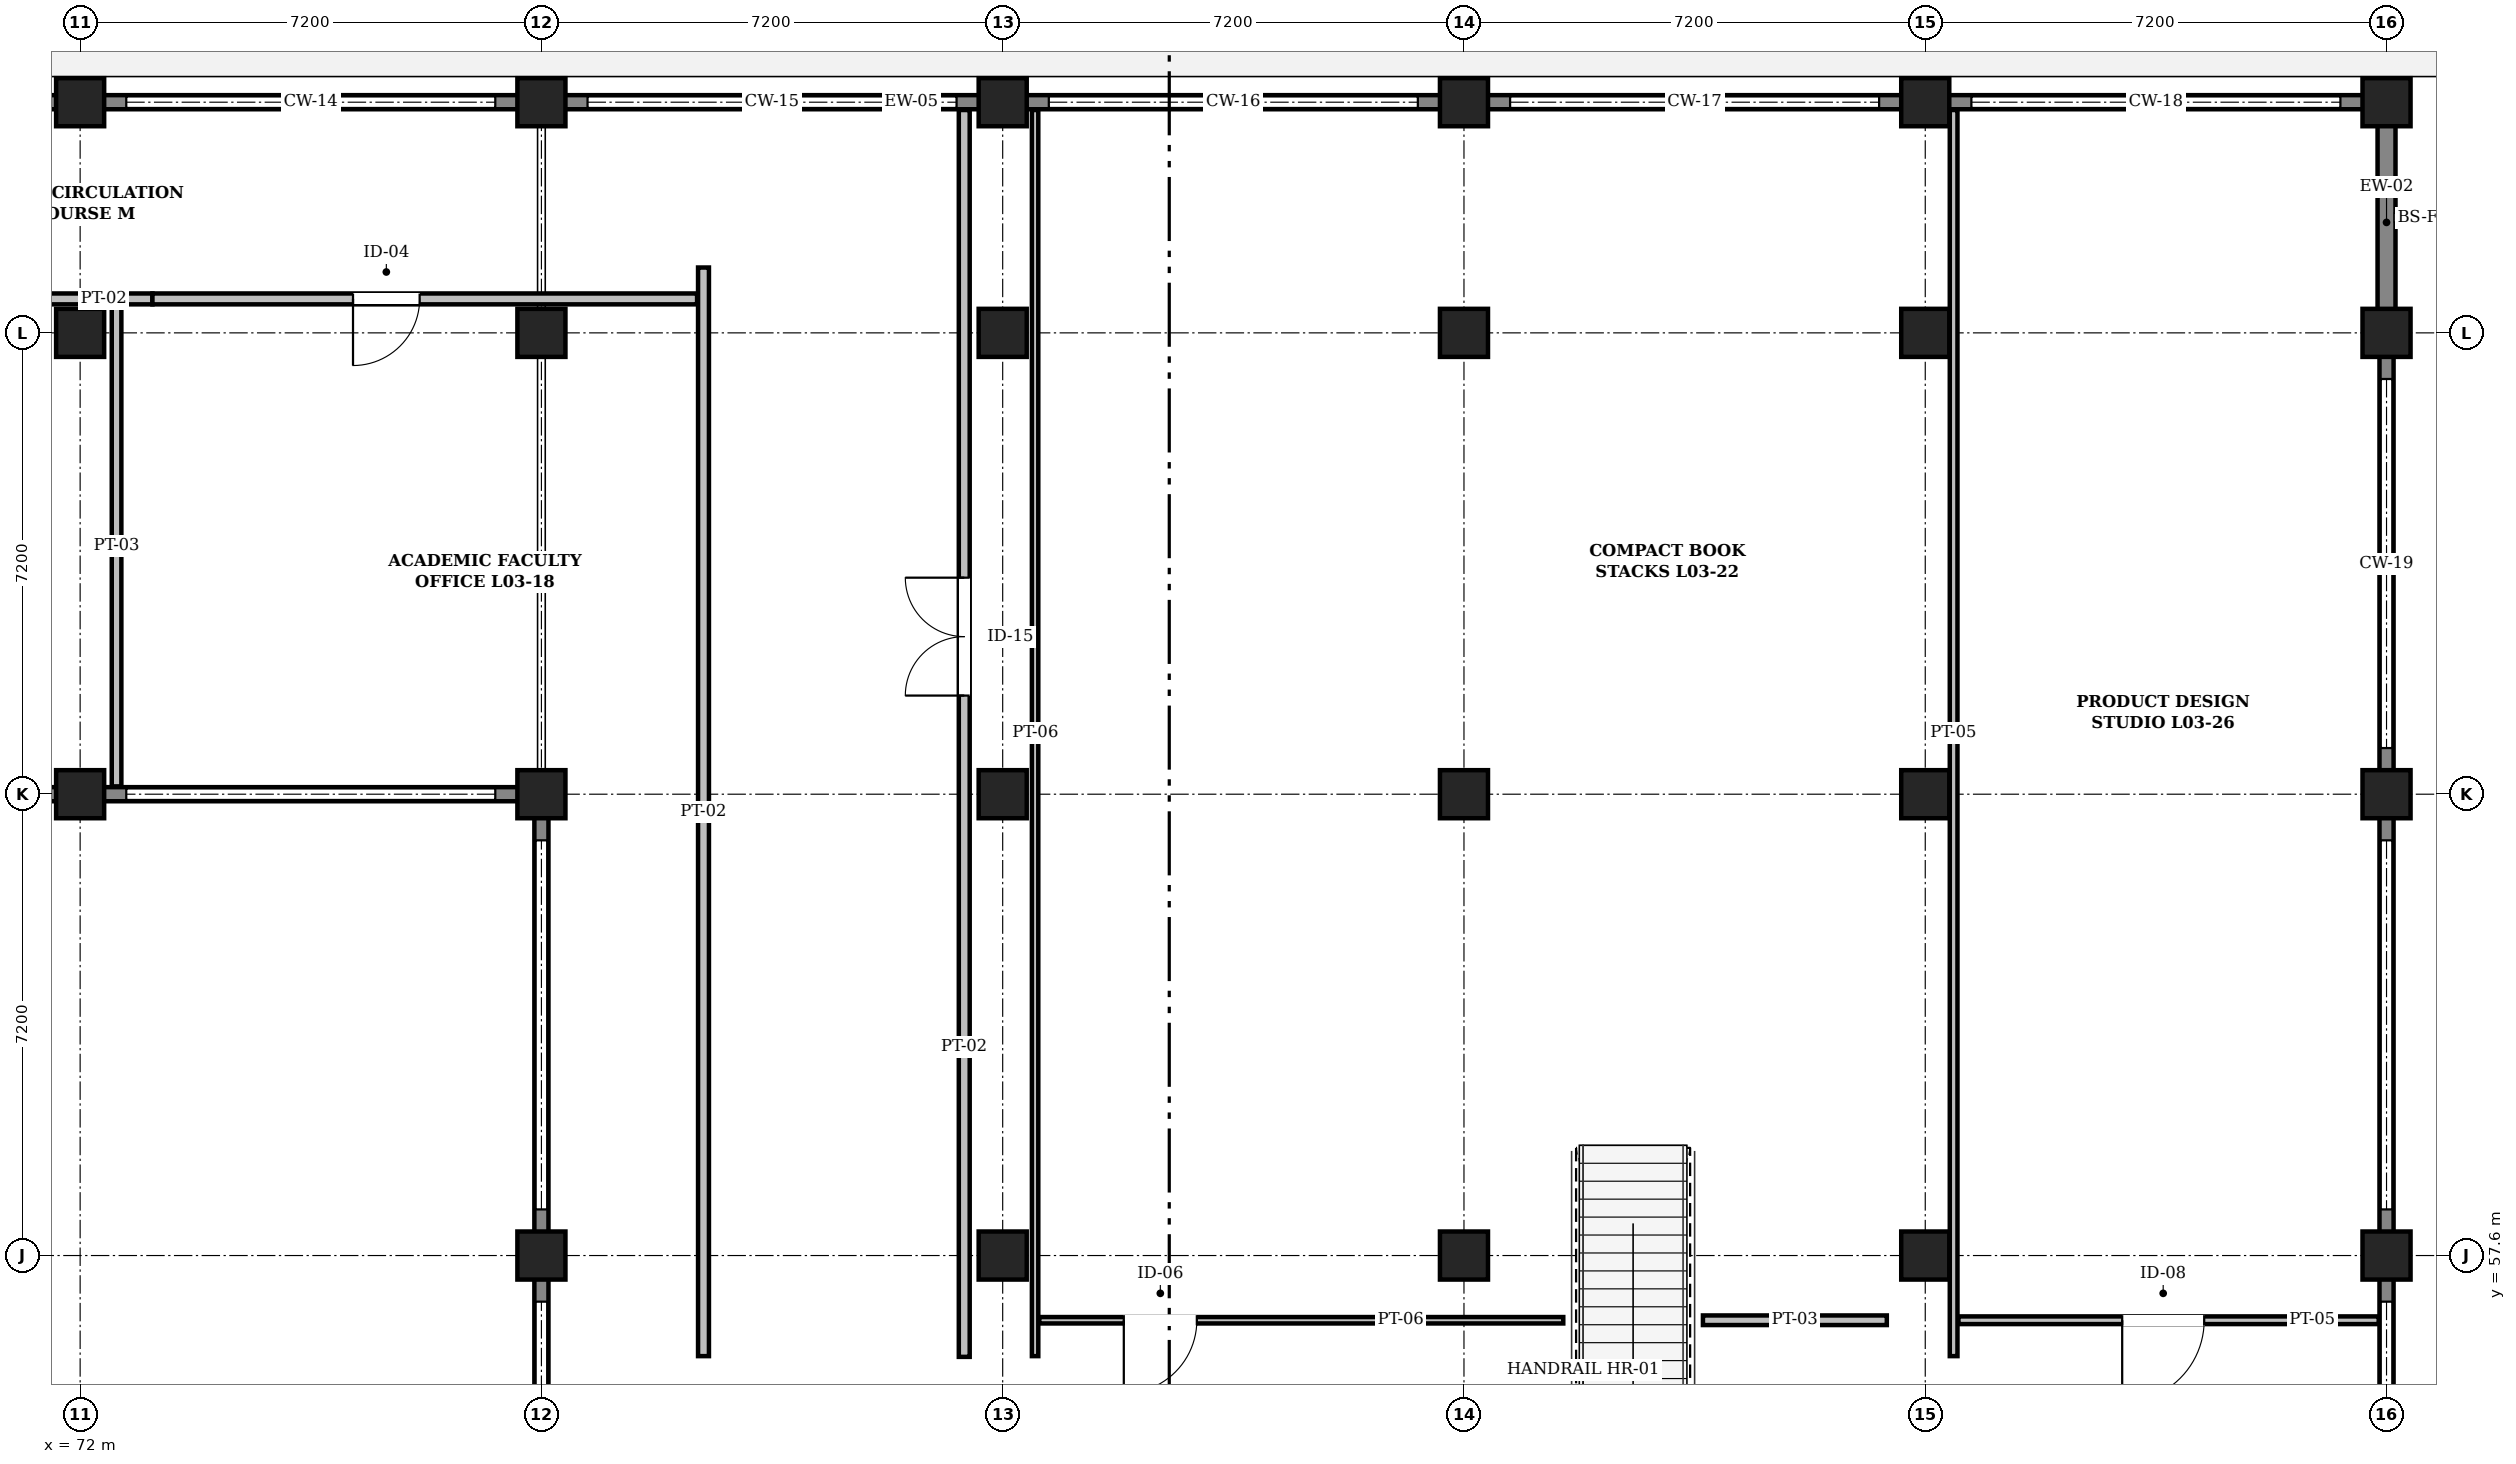
"""IFC4 building model, lengths in metres.
Left out: names, types, materials, properties, quantities, classifications, styles, units other than length and angle.
Written with IfcOpenShell. Run it as: python <this file> out.ifc"""

import sys

from ifc_helpers import new_model, si_unit, direction, frame, frame_2d, origin, origin_2d, place, context, subcontext, project, spatial, rectangle, extrude, element, fill, save


model = new_model("IFC4")
c1 = context("Model", 3, precision=1e-05, world=origin(), true_north=direction((0.0, 1.0)))
c2 = subcontext(c1, "Body", "Model", "MODEL_VIEW")
j1 = project(units=[si_unit("LENGTHUNIT", "METRE"), si_unit("PLANEANGLEUNIT", "RADIAN")], contexts=[c1])
p1 = place(None, origin())
s1 = spatial("IfcSite", under=j1, at=p1, CompositionType="ELEMENT")
p2 = place(p1, origin())
s2 = spatial("IfcBuilding", under=s1, at=p2, CompositionType="ELEMENT")
p3 = place(p2, frame((0.0, 0.0, 14.4)))
s3 = spatial("IfcBuildingStorey", under=s2, at=p3, CompositionType="ELEMENT", Elevation=14.4)
for number, where, z_axis, x_axis in (
    (1, (72.0, 64.8, 0.0), (0.0, 0.0, 1.0), (1.0, 0.0, 0.0)),
    (2, (72.0, 72.0, 0.0), (0.0, 0.0, 1.0), (1.0, 0.0, 0.0)),
    (3, (72.0, 75.6, 0.0), (0.0, 0.0, 1.0), (1.0, 0.0, 0.0)),
    (4, (79.2, 57.6, 0.0), (0.0, 0.0, 1.0), (1.0, 0.0, 0.0)),
    (5, (79.2, 64.8, 0.0), (0.0, 0.0, 1.0), (1.0, 0.0, 0.0)),
    (6, (79.2, 72.0, 0.0), (0.0, 0.0, 1.0), (1.0, 0.0, 0.0)),
    (7, (79.2, 75.6, 0.0), (0.0, 0.0, 1.0), (1.0, 0.0, 0.0)),
    (8, (86.4, 57.6, 0.0), (0.0, 0.0, 1.0), (1.0, 0.0, 0.0)),
    (9, (86.4, 64.8, 0.0), (0.0, 0.0, 1.0), (1.0, 0.0, 0.0)),
    (10, (86.4, 72.0, 0.0), (0.0, 0.0, 1.0), (1.0, 0.0, 0.0)),
    (11, (86.4, 75.6, 0.0), (0.0, 0.0, 1.0), (1.0, 0.0, 0.0)),
    (12, (93.6, 57.6, 0.0), (0.0, 0.0, 1.0), (1.0, 0.0, 0.0)),
    (13, (93.6, 64.8, 0.0), (0.0, 0.0, 1.0), (1.0, 0.0, 0.0)),
    (14, (93.6, 72.0, 0.0), (0.0, 0.0, 1.0), (1.0, 0.0, 0.0)),
    (15, (93.6, 75.6, 0.0), (0.0, 0.0, 1.0), (1.0, 0.0, 0.0)),
    (16, (100.8, 57.6, 0.0), (0.0, 0.0, 1.0), (1.0, 0.0, 0.0)),
    (17, (100.8, 64.8, 0.0), (0.0, 0.0, 1.0), (1.0, 0.0, 0.0)),
    (18, (100.8, 72.0, 0.0), (0.0, 0.0, 1.0), (1.0, 0.0, 0.0)),
    (19, (100.8, 75.6, 0.0), (0.0, 0.0, 1.0), (1.0, 0.0, 0.0)),
    (20, (108.0, 57.6, 0.0), (0.0, 0.0, 1.0), (1.0, 0.0, 0.0)),
    (21, (108.0, 64.8, 0.0), (0.0, 0.0, 1.0), (1.0, 0.0, 0.0)),
    (22, (108.0, 72.0, 0.0), (0.0, 0.0, 1.0), (1.0, 0.0, 0.0)),
    (23, (108.0, 75.6, 0.0), (0.0, 0.0, 1.0), (1.0, 0.0, 0.0)),
):
    element("IfcColumn", number, at=place(p3, frame(where, z_axis=z_axis, x_axis=x_axis)), inside=s3, PredefinedType="COLUMN", context=c2, shape_type="SweptSolid", body=[
        extrude(rectangle(XDim=0.75, YDim=0.75, at=origin_2d()), origin(), (0.0, 0.0, 1.0), 4.5),
    ])
for number, where, z_axis, x_axis in (
    (24, (64.8, 75.6, 0.0), (0.0, 0.0, 1.0), (1.0, 0.0, 0.0)),
    (25, (72.0, 75.6, 0.0), (0.0, 0.0, 1.0), (1.0, 0.0, 0.0)),
    (26, (79.2, 75.6, 0.0), (0.0, 0.0, 1.0), (1.0, 0.0, 0.0)),
):
    element("IfcWall", number, at=place(p3, frame(where, z_axis=z_axis, x_axis=x_axis)), inside=s3, PredefinedType="SOLIDWALL", context=c2, shape_type="SweptSolid", body=[
        extrude(rectangle(XDim=7.2, YDim=0.22, at=frame_2d((3.6, 0.0))), origin(), (0.0, 0.0, 1.0), 1.24),
    ])
p4 = place(p3, frame((86.4, 75.6, 0.0), z_axis=(0.0, 0.0, 1.0), x_axis=(1.0, 0.0, 0.0)))
e27 = element("IfcWall", 27, at=p4, inside=s3, PredefinedType="SOLIDWALL", context=c2, shape_type="SweptSolid", body=[
    extrude(rectangle(XDim=7.2, YDim=0.22, at=frame_2d((3.6, 0.0))), origin(), (0.0, 0.0, 1.0), 1.24),
])
p5 = place(p3, frame((93.6, 75.6, 0.0), z_axis=(0.0, 0.0, 1.0), x_axis=(1.0, 0.0, 0.0)))
e28 = element("IfcWall", 28, at=p5, inside=s3, PredefinedType="SOLIDWALL", context=c2, shape_type="SweptSolid", body=[
    extrude(rectangle(XDim=7.2, YDim=0.22, at=frame_2d((3.6, 0.0))), origin(), (0.0, 0.0, 1.0), 1.24),
])
p6 = place(p3, frame((100.8, 75.6, 0.0), z_axis=(0.0, 0.0, 1.0), x_axis=(1.0, 0.0, 0.0)))
e29 = element("IfcWall", 29, at=p6, inside=s3, PredefinedType="SOLIDWALL", context=c2, shape_type="SweptSolid", body=[
    extrude(rectangle(XDim=7.35, YDim=0.22, at=frame_2d((3.675, 0.0))), origin(), (0.0, 0.0, 1.0), 1.24),
])
p7 = place(p3, frame((108.0, 75.448, 0.0), z_axis=(0.0, 0.0, 1.0), x_axis=(0.0, -1.0, 0.0)))
e30 = element("IfcWall", 30, at=p7, inside=s3, PredefinedType="SOLIDWALL", context=c2, shape_type="SweptSolid", body=[
    extrude(rectangle(XDim=3.448, YDim=0.28, at=frame_2d((1.724, 0.0))), origin(), (0.0, 0.0, 1.0), 4.22),
])
for number, where, z_axis, x_axis in (
    (31, (108.0, 72.0, 0.0), (0.0, 0.0, 1.0), (0.0, -1.0, 0.0)),
    (32, (108.0, 64.8, 0.0), (0.0, 0.0, 1.0), (0.0, -1.0, 0.0)),
):
    element("IfcWall", number, at=place(p3, frame(where, z_axis=z_axis, x_axis=x_axis)), inside=s3, PredefinedType="SOLIDWALL", context=c2, shape_type="SweptSolid", body=[
        extrude(rectangle(XDim=7.2, YDim=0.22, at=frame_2d((3.6, 0.0))), origin(), (0.0, 0.0, 1.0), 1.24),
    ])
for number, where, z_axis, x_axis in (
    (33, (108.0, 57.6, 0.0), (0.0, 0.0, 1.0), (0.0, -1.0, 0.0)),
    (34, (79.2, 50.4, 0.0), (0.0, 0.0, 1.0), (0.0, 1.0, 0.0)),
):
    element("IfcWall", number, at=place(p3, frame(where, z_axis=z_axis, x_axis=x_axis)), inside=s3, PredefinedType="SOLIDWALL", context=c2, shape_type="SweptSolid", body=[
        extrude(rectangle(XDim=7.2, YDim=0.22, at=frame_2d((3.6, 0.0))), origin(), (0.0, 0.0, 1.0), 1.24),
    ])
p8 = place(p3, frame((79.2, 57.6, 0.0), z_axis=(0.0, 0.0, 1.0), x_axis=(0.0, 1.0, 0.0)))
e35 = element("IfcWall", 35, at=p8, inside=s3, PredefinedType="SOLIDWALL", context=c2, shape_type="SweptSolid", body=[
    extrude(rectangle(XDim=7.048, YDim=0.22, at=frame_2d((3.524, 0.0))), origin(), (0.0, 0.0, 1.0), 1.24),
])
p9 = place(p3, frame((79.35, 64.8, 0.0), z_axis=(0.0, 0.0, 1.0), x_axis=(-1.0, 0.0, 0.0)))
e36 = element("IfcWall", 36, at=p9, inside=s3, PredefinedType="SOLIDWALL", context=c2, shape_type="SweptSolid", body=[
    extrude(rectangle(XDim=7.35, YDim=0.22, at=frame_2d((3.675, 0.0))), origin(), (0.0, 0.0, 1.0), 1.24),
])
p10 = place(p3, frame((72.0, 64.8, 0.0), z_axis=(0.0, 0.0, 1.0), x_axis=(-1.0, 0.0, 0.0)))
e37 = element("IfcWall", 37, at=p10, inside=s3, PredefinedType="SOLIDWALL", context=c2, shape_type="SweptSolid", body=[
    extrude(rectangle(XDim=7.2, YDim=0.22, at=frame_2d((3.6, 0.0))), origin(), (0.0, 0.0, 1.0), 1.24),
])
p11 = place(p3, frame((85.8, 56.019, 0.0), z_axis=(0.0, 0.0, 1.0), x_axis=(0.0, 1.0, 0.0)))
e38 = element("IfcWall", 38, at=p11, inside=s3, PredefinedType="PARTITIONING", context=c2, shape_type="SweptSolid", body=[
    extrude(rectangle(XDim=19.459, YDim=0.17, at=frame_2d((9.73, 0.0))), origin(), (0.0, 0.0, 1.0), 4.16),
])
p12 = place(p11, frame((10.321, 0.0, 0.0)))
e39 = element("IfcOpeningElement", 39, at=p12, cuts=e38, PredefinedType="OPENING", context=c2, shape_type="SweptSolid", body=[
    extrude(rectangle(XDim=1.84, YDim=2.3, at=frame_2d((0.92, 1.15))), frame((0.0, 0.097, 0.0), z_axis=(0.0, -1.0, 0.0), x_axis=(1.0, 0.0, 0.0)), (0.0, 0.0, 1.0), 0.194),
])
p13 = place(p3, frame((81.73, 56.03, 0.0), z_axis=(0.0, 0.0, 1.0), x_axis=(0.0, 1.0, 0.0)))
e40 = element("IfcWall", 40, at=p13, inside=s3, PredefinedType="PARTITIONING", context=c2, shape_type="SweptSolid", body=[
    extrude(rectangle(XDim=16.99, YDim=0.17, at=frame_2d((8.495, 0.0))), origin(), (0.0, 0.0, 1.0), 4.16),
])
p14 = place(p3, frame((57.671, 72.53, 0.0), z_axis=(0.0, 0.0, 1.0), x_axis=(1.0, 0.0, 0.0)))
e41 = element("IfcWall", 41, at=p14, inside=s3, PredefinedType="PARTITIONING", context=c2, shape_type="SweptSolid", body=[
    extrude(rectangle(XDim=15.457, YDim=0.17, at=frame_2d((7.729, 0.0))), origin(), (0.0, 0.0, 1.0), 4.16),
])
p15 = place(p14, frame((9.049, 0.0, 0.0)))
e42 = element("IfcOpeningElement", 42, at=p15, cuts=e41, PredefinedType="OPENING", context=c2, shape_type="SweptSolid", body=[
    extrude(rectangle(XDim=1.76, YDim=2.3, at=frame_2d((0.88, 1.15))), frame((0.0, 0.097, 0.0), z_axis=(0.0, -1.0, 0.0), x_axis=(1.0, 0.0, 0.0)), (0.0, 0.0, 1.0), 0.194),
])
p16 = place(p3, frame((73.129, 72.53, 0.0), z_axis=(0.0, 0.0, 1.0), x_axis=(1.0, 0.0, 0.0)))
e43 = element("IfcWall", 43, at=p16, inside=s3, PredefinedType="PARTITIONING", context=c2, shape_type="SweptSolid", body=[
    extrude(rectangle(XDim=8.501, YDim=0.17, at=frame_2d((4.25, 0.0))), origin(), (0.0, 0.0, 1.0), 4.16),
])
p17 = place(p16, frame((3.131, 0.0, 0.0)))
e44 = element("IfcOpeningElement", 44, at=p17, cuts=e43, PredefinedType="OPENING", context=c2, shape_type="SweptSolid", body=[
    extrude(rectangle(XDim=1.04, YDim=2.18, at=frame_2d((0.52, 1.09))), frame((0.0, 0.097, 0.0), z_axis=(0.0, -1.0, 0.0), x_axis=(1.0, 0.0, 0.0)), (0.0, 0.0, 1.0), 0.194),
])
p18 = place(p3, frame((72.569, 64.922, 0.0), z_axis=(0.0, 0.0, 1.0), x_axis=(0.0, 1.0, 0.0)))
e45 = element("IfcWall", 45, at=p18, inside=s3, PredefinedType="PARTITIONING", context=c2, shape_type="SweptSolid", body=[
    extrude(rectangle(XDim=7.508, YDim=0.15, at=frame_2d((3.754, 0.0))), origin(), (0.0, 0.0, 1.0), 4.16),
])
p19 = place(p3, frame((86.906, 56.03, 0.0), z_axis=(0.0, 0.0, 1.0), x_axis=(0.0, 1.0, 0.0)))
e46 = element("IfcWall", 46, at=p19, inside=s3, PredefinedType="PARTITIONING", context=c2, shape_type="SweptSolid", body=[
    extrude(rectangle(XDim=19.448, YDim=0.1, at=frame_2d((9.724, 0.0))), origin(), (0.0, 0.0, 1.0), 4.16),
])
p20 = place(p3, frame((86.971, 56.59, 0.0), z_axis=(0.0, 0.0, 1.0), x_axis=(1.0, 0.0, 0.0)))
e47 = element("IfcWall", 47, at=p20, inside=s3, PredefinedType="PARTITIONING", context=c2, shape_type="SweptSolid", body=[
    extrude(rectangle(XDim=8.179, YDim=0.1, at=frame_2d((4.09, 0.0))), origin(), (0.0, 0.0, 1.0), 4.16),
])
p21 = place(p20, frame((1.32, 0.0, 0.0)))
e48 = element("IfcOpeningElement", 48, at=p21, cuts=e47, PredefinedType="OPENING", context=c2, shape_type="SweptSolid", body=[
    extrude(rectangle(XDim=1.14, YDim=2.2, at=frame_2d((0.57, 1.1))), frame((0.0, 0.062, 0.0), z_axis=(0.0, -1.0, 0.0), x_axis=(1.0, 0.0, 0.0)), (0.0, 0.0, 1.0), 0.124),
])
p22 = place(p3, frame((97.33, 56.59, 0.0), z_axis=(0.0, 0.0, 1.0), x_axis=(1.0, 0.0, 0.0)))
e49 = element("IfcWall", 49, at=p22, inside=s3, PredefinedType="PARTITIONING", context=c2, shape_type="SweptSolid", body=[
    extrude(rectangle(XDim=2.87, YDim=0.15, at=frame_2d((1.435, 0.0))), origin(), (0.0, 0.0, 1.0), 4.16),
])
p23 = place(p3, frame((101.243, 56.03, 0.0), z_axis=(0.0, 0.0, 1.0), x_axis=(0.0, 1.0, 0.0)))
e50 = element("IfcWall", 50, at=p23, inside=s3, PredefinedType="PARTITIONING", context=c2, shape_type="SweptSolid", body=[
    extrude(rectangle(XDim=19.448, YDim=0.12, at=frame_2d((9.724, 0.0))), origin(), (0.0, 0.0, 1.0), 4.16),
])
p24 = place(p3, frame((101.318, 56.59, 0.0), z_axis=(0.0, 0.0, 1.0), x_axis=(1.0, 0.0, 0.0)))
e51 = element("IfcWall", 51, at=p24, inside=s3, PredefinedType="PARTITIONING", context=c2, shape_type="SweptSolid", body=[
    extrude(rectangle(XDim=6.56, YDim=0.12, at=frame_2d((3.28, 0.0))), origin(), (0.0, 0.0, 1.0), 4.16),
])
p25 = place(p24, frame((2.556, 0.0, 0.0)))
e52 = element("IfcOpeningElement", 52, at=p25, cuts=e51, PredefinedType="OPENING", context=c2, shape_type="SweptSolid", body=[
    extrude(rectangle(XDim=1.28, YDim=2.22, at=frame_2d((0.64, 1.11))), frame((0.0, 0.072, 0.0), z_axis=(0.0, -1.0, 0.0), x_axis=(1.0, 0.0, 0.0)), (0.0, 0.0, 1.0), 0.144),
])
p26 = place(p17, frame((1.04, 0.0, 0.0), z_axis=(0.0, 0.0, 1.0), x_axis=(-1.0, 0.0, 0.0)))
e53 = element("IfcDoor", 53, at=p26, inside=s3, OperationType="SINGLE_SWING_RIGHT", PredefinedType="DOOR", context=c2, shape_type="SweptSolid", body=[
    extrude(rectangle(XDim=1.04, YDim=2.18, at=frame_2d((0.52, 1.09))), frame((0.0, 0.025, 0.0), z_axis=(0.0, -1.0, 0.0), x_axis=(1.0, 0.0, 0.0)), (0.0, 0.0, 1.0), 0.05),
])
fill(e44, e53)
p27 = place(p12, origin())
e54 = element("IfcDoor", 54, at=p27, inside=s3, OperationType="DOUBLE_DOOR_SINGLE_SWING", PredefinedType="DOOR", context=c2, shape_type="SweptSolid", body=[
    extrude(rectangle(XDim=1.84, YDim=2.3, at=frame_2d((0.92, 1.15))), frame((0.0, 0.025, 0.0), z_axis=(0.0, -1.0, 0.0), x_axis=(1.0, 0.0, 0.0)), (0.0, 0.0, 1.0), 0.05),
])
fill(e39, e54)
p28 = place(p21, frame((1.14, 0.0, 0.0), z_axis=(0.0, 0.0, 1.0), x_axis=(-1.0, 0.0, 0.0)))
e55 = element("IfcDoor", 55, at=p28, inside=s3, OperationType="SINGLE_SWING_RIGHT", PredefinedType="DOOR", context=c2, shape_type="SweptSolid", body=[
    extrude(rectangle(XDim=1.14, YDim=2.2, at=frame_2d((0.57, 1.1))), frame((0.0, 0.025, 0.0), z_axis=(0.0, -1.0, 0.0), x_axis=(1.0, 0.0, 0.0)), (0.0, 0.0, 1.0), 0.05),
])
fill(e48, e55)
p29 = place(p25, frame((1.28, 0.0, 0.0), z_axis=(0.0, 0.0, 1.0), x_axis=(-1.0, 0.0, 0.0)))
e56 = element("IfcDoor", 56, at=p29, inside=s3, OperationType="SINGLE_SWING_RIGHT", PredefinedType="DOOR", context=c2, shape_type="SweptSolid", body=[
    extrude(rectangle(XDim=1.28, YDim=2.22, at=frame_2d((0.64, 1.11))), frame((0.0, 0.025, 0.0), z_axis=(0.0, -1.0, 0.0), x_axis=(1.0, 0.0, 0.0)), (0.0, 0.0, 1.0), 0.05),
])
fill(e52, e56)
save(model, sys.argv[1])
